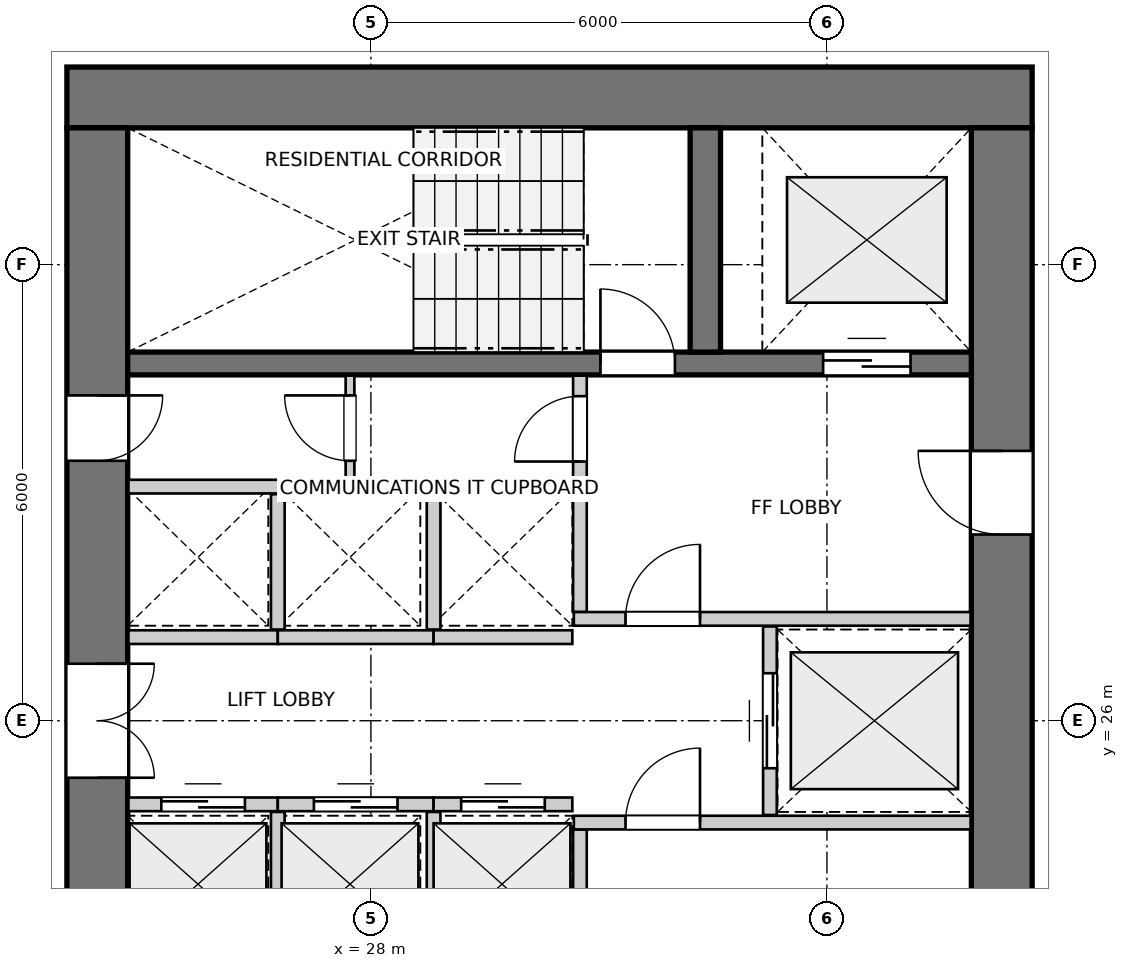
"""IFC4 building model, lengths in metres.
Left out: names, types, materials, properties, quantities, classifications, styles, units other than length and angle.
Written with IfcOpenShell. Run it as: python <this file> out.ifc"""

import sys

from ifc_helpers import new_model, si_unit, direction, frame, frame_2d, origin, place, context, subcontext, project, spatial, rectangle, extrude, source, transform, mapped, element, fill, save


model = new_model("IFC4")
c1 = context("Model", 3, precision=1e-05, world=origin(), true_north=direction((0.0, 1.0)))
c2 = subcontext(c1, "Body", "Model", "MODEL_VIEW")
j1 = project(units=[si_unit("LENGTHUNIT", "METRE"), si_unit("PLANEANGLEUNIT", "RADIAN")], contexts=[c1])
p1 = place(None, origin())
s1 = spatial("IfcSite", under=j1, at=p1, CompositionType="ELEMENT")
p2 = place(p1, origin())
s2 = spatial("IfcBuilding", under=s1, at=p2, CompositionType="ELEMENT")
p3 = place(p2, frame((0.0, 0.0, 46.2)))
s3 = spatial("IfcBuildingStorey", under=s2, at=p3, CompositionType="ELEMENT", Elevation=46.2)
p4 = place(p3, frame((36.7, 34.2, 0.0), z_axis=(0.0, 0.0, 1.0), x_axis=(-1.0, 0.0, 0.0)))
e1 = element("IfcWall", 1, at=p4, inside=s3, PredefinedType="SHEAR", context=c2, shape_type="SweptSolid", body=[
    extrude(rectangle(XDim=12.7, YDim=0.8, at=frame_2d((6.35, 0.0))), origin(), (0.0, 0.0, 1.0), 2.94),
])
p5 = place(p3, frame((24.4, 33.8, 0.0), z_axis=(0.0, 0.0, 1.0), x_axis=(0.0, -1.0, 0.0)))
e2 = element("IfcWall", 2, at=p5, inside=s3, PredefinedType="SHEAR", context=c2, shape_type="SweptSolid", body=[
    extrude(rectangle(XDim=15.6, YDim=0.8, at=frame_2d((7.8, 0.0))), origin(), (0.0, 0.0, 1.0), 2.94),
])
p6 = place(p5, frame((7.05, 0.0, 0.0)))
e3 = element("IfcOpeningElement", 3, at=p6, cuts=e2, PredefinedType="OPENING", context=c2, shape_type="SweptSolid", body=[
    extrude(rectangle(XDim=1.5, YDim=2.15, at=frame_2d((0.75, 1.075))), frame((0.0, 0.41, 0.0), z_axis=(0.0, -1.0, 0.0), x_axis=(1.0, 0.0, 0.0)), (0.0, 0.0, 1.0), 0.82),
])
p7 = place(p5, frame((3.52, 0.0, 0.0)))
e4 = element("IfcOpeningElement", 4, at=p7, cuts=e2, PredefinedType="OPENING", context=c2, shape_type="SweptSolid", body=[
    extrude(rectangle(XDim=0.86, YDim=2.05, at=frame_2d((0.43, 1.025))), frame((0.0, 0.41, 0.0), z_axis=(0.0, -1.0, 0.0), x_axis=(1.0, 0.0, 0.0)), (0.0, 0.0, 1.0), 0.82),
])
p8 = place(p5, frame((11.22, 0.0, 0.0)))
e5 = element("IfcOpeningElement", 5, at=p8, cuts=e2, PredefinedType="OPENING", context=c2, shape_type="SweptSolid", body=[
    extrude(rectangle(XDim=0.86, YDim=2.05, at=frame_2d((0.43, 1.025))), frame((0.0, 0.41, 0.0), z_axis=(0.0, -1.0, 0.0), x_axis=(1.0, 0.0, 0.0)), (0.0, 0.0, 1.0), 0.82),
])
p9 = place(p3, frame((36.3, 18.2, 0.0), z_axis=(0.0, 0.0, 1.0), x_axis=(0.0, 1.0, 0.0)))
e6 = element("IfcWall", 6, at=p9, inside=s3, PredefinedType="SHEAR", context=c2, shape_type="SweptSolid", body=[
    extrude(rectangle(XDim=15.6, YDim=0.8, at=frame_2d((7.8, 0.0))), origin(), (0.0, 0.0, 1.0), 2.94),
])
p10 = place(p9, frame((4.25, 0.0, 0.0)))
e7 = element("IfcOpeningElement", 7, at=p10, cuts=e6, PredefinedType="OPENING", context=c2, shape_type="SweptSolid", body=[
    extrude(rectangle(XDim=1.1, YDim=2.15, at=frame_2d((0.55, 1.075))), frame((0.0, 0.41, 0.0), z_axis=(0.0, -1.0, 0.0), x_axis=(1.0, 0.0, 0.0)), (0.0, 0.0, 1.0), 0.82),
])
p11 = place(p9, frame((10.25, 0.0, 0.0)))
e8 = element("IfcOpeningElement", 8, at=p11, cuts=e6, PredefinedType="OPENING", context=c2, shape_type="SweptSolid", body=[
    extrude(rectangle(XDim=1.1, YDim=2.15, at=frame_2d((0.55, 1.075))), frame((0.0, 0.41, 0.0), z_axis=(0.0, -1.0, 0.0), x_axis=(1.0, 0.0, 0.0)), (0.0, 0.0, 1.0), 0.82),
])
p12 = place(p3, frame((24.8, 30.7, 0.0), z_axis=(0.0, 0.0, 1.0), x_axis=(1.0, 0.0, 0.0)))
e9 = element("IfcWall", 9, at=p12, inside=s3, PredefinedType="SHEAR", context=c2, shape_type="SweptSolid", body=[
    extrude(rectangle(XDim=11.1, YDim=0.3, at=frame_2d((5.55, 0.0))), origin(), (0.0, 0.0, 1.0), 2.94),
])
p13 = place(p12, frame((6.22, 0.0, 0.0)))
e10 = element("IfcOpeningElement", 10, at=p13, cuts=e9, PredefinedType="OPENING", context=c2, shape_type="SweptSolid", body=[
    extrude(rectangle(XDim=0.98, YDim=2.15, at=frame_2d((0.49, 1.075))), frame((0.0, 0.16, 0.0), z_axis=(0.0, -1.0, 0.0), x_axis=(1.0, 0.0, 0.0)), (0.0, 0.0, 1.0), 0.32),
])
p14 = place(p12, frame((9.15, 0.0, 0.0)))
e11 = element("IfcOpeningElement", 11, at=p14, cuts=e9, PredefinedType="OPENING", context=c2, shape_type="SweptSolid", body=[
    extrude(rectangle(XDim=1.15, YDim=2.15, at=frame_2d((0.575, 1.075))), frame((0.0, 0.16, 0.0), z_axis=(0.0, -1.0, 0.0), x_axis=(1.0, 0.0, 0.0)), (0.0, 0.0, 1.0), 0.32),
])
p15 = place(p3, frame((32.4, 30.85, 0.0), z_axis=(0.0, 0.0, 1.0), x_axis=(0.0, 1.0, 0.0)))
e12 = element("IfcWall", 12, at=p15, inside=s3, PredefinedType="SHEAR", context=c2, shape_type="SweptSolid", body=[
    extrude(rectangle(XDim=2.95, YDim=0.4, at=frame_2d((1.475, 0.0))), origin(), (0.0, 0.0, 1.0), 2.94),
])
p16 = place(p3, frame((30.75, 21.46, 0.0), z_axis=(0.0, 0.0, 1.0), x_axis=(0.0, 1.0, 0.0)))
e13 = element("IfcWall", 13, at=p16, inside=s3, PredefinedType="PARTITIONING", context=c2, shape_type="SweptSolid", body=[
    extrude(rectangle(XDim=3.11, YDim=0.18, at=frame_2d((1.555, 0.0))), origin(), (0.0, 0.0, 1.0), 2.94),
])
p17 = place(p16, frame((0.26, 0.0, 0.0)))
e14 = element("IfcOpeningElement", 14, at=p17, cuts=e13, PredefinedType="OPENING", context=c2, shape_type="SweptSolid", body=[
    extrude(rectangle(XDim=0.86, YDim=2.05, at=frame_2d((0.43, 1.025))), frame((0.0, 0.1, 0.0), z_axis=(0.0, -1.0, 0.0), x_axis=(1.0, 0.0, 0.0)), (0.0, 0.0, 1.0), 0.2),
])
p18 = place(p3, frame((30.67, 24.66, 0.0), z_axis=(0.0, 0.0, 1.0), x_axis=(1.0, 0.0, 0.0)))
e15 = element("IfcWall", 15, at=p18, inside=s3, PredefinedType="PARTITIONING", context=c2, shape_type="SweptSolid", body=[
    extrude(rectangle(XDim=5.22, YDim=0.18, at=frame_2d((2.61, 0.0))), origin(), (0.0, 0.0, 1.0), 2.94),
])
p19 = place(p18, frame((0.68, 0.0, 0.0)))
e16 = element("IfcOpeningElement", 16, at=p19, cuts=e15, PredefinedType="OPENING", context=c2, shape_type="SweptSolid", body=[
    extrude(rectangle(XDim=0.98, YDim=2.15, at=frame_2d((0.49, 1.075))), frame((0.0, 0.1, 0.0), z_axis=(0.0, -1.0, 0.0), x_axis=(1.0, 0.0, 0.0)), (0.0, 0.0, 1.0), 0.2),
])
p20 = place(p3, frame((30.75, 27.43, 0.0), z_axis=(0.0, 0.0, 1.0), x_axis=(0.0, 1.0, 0.0)))
e17 = element("IfcWall", 17, at=p20, inside=s3, PredefinedType="PARTITIONING", context=c2, shape_type="SweptSolid", body=[
    extrude(rectangle(XDim=3.11, YDim=0.18, at=frame_2d((1.555, 0.0))), origin(), (0.0, 0.0, 1.0), 2.94),
])
p21 = place(p20, frame((1.98, 0.0, 0.0)))
e18 = element("IfcOpeningElement", 18, at=p21, cuts=e17, PredefinedType="OPENING", context=c2, shape_type="SweptSolid", body=[
    extrude(rectangle(XDim=0.86, YDim=2.05, at=frame_2d((0.43, 1.025))), frame((0.0, 0.1, 0.0), z_axis=(0.0, -1.0, 0.0), x_axis=(1.0, 0.0, 0.0)), (0.0, 0.0, 1.0), 0.2),
])
p22 = place(p3, frame((30.67, 27.34, 0.0), z_axis=(0.0, 0.0, 1.0), x_axis=(1.0, 0.0, 0.0)))
e19 = element("IfcWall", 19, at=p22, inside=s3, PredefinedType="PARTITIONING", context=c2, shape_type="SweptSolid", body=[
    extrude(rectangle(XDim=5.22, YDim=0.18, at=frame_2d((2.61, 0.0))), origin(), (0.0, 0.0, 1.0), 2.94),
])
p23 = place(p22, frame((0.68, 0.0, 0.0)))
e20 = element("IfcOpeningElement", 20, at=p23, cuts=e19, PredefinedType="OPENING", context=c2, shape_type="SweptSolid", body=[
    extrude(rectangle(XDim=0.98, YDim=2.15, at=frame_2d((0.49, 1.075))), frame((0.0, 0.1, 0.0), z_axis=(0.0, -1.0, 0.0), x_axis=(1.0, 0.0, 0.0)), (0.0, 0.0, 1.0), 0.2),
])
p24 = place(p3, frame((33.25, 24.76, 0.0), z_axis=(0.0, 0.0, 1.0), x_axis=(0.0, 1.0, 0.0)))
e21 = element("IfcWall", 21, at=p24, inside=s3, PredefinedType="PARTITIONING", context=c2, shape_type="SweptSolid", body=[
    extrude(rectangle(XDim=2.48, YDim=0.18, at=frame_2d((1.24, 0.0))), origin(), (0.0, 0.0, 1.0), 2.94),
])
p25 = place(p24, frame((0.615, 0.0, 0.0)))
e22 = element("IfcOpeningElement", 22, at=p25, cuts=e21, PredefinedType="OPENING", context=c2, shape_type="SweptSolid", body=[
    extrude(rectangle(XDim=1.25, YDim=2.15, at=frame_2d((0.625, 1.075))), frame((0.0, 0.1, 0.0), z_axis=(0.0, -1.0, 0.0), x_axis=(1.0, 0.0, 0.0)), (0.0, 0.0, 1.0), 0.2),
])
p26 = place(p3, frame((24.81, 24.9, 0.0), z_axis=(0.0, 0.0, 1.0), x_axis=(1.0, 0.0, 0.0)))
e23 = element("IfcWall", 23, at=p26, inside=s3, PredefinedType="PARTITIONING", context=c2, shape_type="SweptSolid", body=[
    extrude(rectangle(XDim=1.965, YDim=0.18, at=frame_2d((0.982, 0.0))), origin(), (0.0, 0.0, 1.0), 2.94),
])
p27 = place(p26, frame((0.433, 0.0, 0.0)))
e24 = element("IfcOpeningElement", 24, at=p27, cuts=e23, PredefinedType="OPENING", context=c2, shape_type="SweptSolid", body=[
    extrude(rectangle(XDim=1.1, YDim=2.15, at=frame_2d((0.55, 1.075))), frame((0.0, 0.1, 0.0), z_axis=(0.0, -1.0, 0.0), x_axis=(1.0, 0.0, 0.0)), (0.0, 0.0, 1.0), 0.2),
])
p28 = place(p3, frame((26.775, 24.9, 0.0), z_axis=(0.0, 0.0, 1.0), x_axis=(1.0, 0.0, 0.0)))
e25 = element("IfcWall", 25, at=p28, inside=s3, PredefinedType="PARTITIONING", context=c2, shape_type="SweptSolid", body=[
    extrude(rectangle(XDim=2.05, YDim=0.18, at=frame_2d((1.025, 0.0))), origin(), (0.0, 0.0, 1.0), 2.94),
])
p29 = place(p28, frame((0.475, 0.0, 0.0)))
e26 = element("IfcOpeningElement", 26, at=p29, cuts=e25, PredefinedType="OPENING", context=c2, shape_type="SweptSolid", body=[
    extrude(rectangle(XDim=1.1, YDim=2.15, at=frame_2d((0.55, 1.075))), frame((0.0, 0.1, 0.0), z_axis=(0.0, -1.0, 0.0), x_axis=(1.0, 0.0, 0.0)), (0.0, 0.0, 1.0), 0.2),
])
p30 = place(p3, frame((26.775, 23.02, 0.0), z_axis=(0.0, 0.0, 1.0), x_axis=(0.0, 1.0, 0.0)))
e27 = element("IfcWall", 27, at=p30, inside=s3, PredefinedType="PARTITIONING", context=c2, shape_type="SweptSolid", body=[
    extrude(rectangle(XDim=1.78, YDim=0.18, at=frame_2d((0.89, 0.0))), origin(), (0.0, 0.0, 1.0), 2.94),
])
p31 = place(p3, frame((28.825, 24.9, 0.0), z_axis=(0.0, 0.0, 1.0), x_axis=(1.0, 0.0, 0.0)))
e28 = element("IfcWall", 28, at=p31, inside=s3, PredefinedType="PARTITIONING", context=c2, shape_type="SweptSolid", body=[
    extrude(rectangle(XDim=1.825, YDim=0.18, at=frame_2d((0.913, 0.0))), origin(), (0.0, 0.0, 1.0), 2.94),
])
p32 = place(p31, frame((0.363, 0.0, 0.0)))
e29 = element("IfcOpeningElement", 29, at=p32, cuts=e28, PredefinedType="OPENING", context=c2, shape_type="SweptSolid", body=[
    extrude(rectangle(XDim=1.1, YDim=2.15, at=frame_2d((0.55, 1.075))), frame((0.0, 0.1, 0.0), z_axis=(0.0, -1.0, 0.0), x_axis=(1.0, 0.0, 0.0)), (0.0, 0.0, 1.0), 0.2),
])
p33 = place(p3, frame((28.825, 23.02, 0.0), z_axis=(0.0, 0.0, 1.0), x_axis=(0.0, 1.0, 0.0)))
e30 = element("IfcWall", 30, at=p33, inside=s3, PredefinedType="PARTITIONING", context=c2, shape_type="SweptSolid", body=[
    extrude(rectangle(XDim=1.78, YDim=0.18, at=frame_2d((0.89, 0.0))), origin(), (0.0, 0.0, 1.0), 2.94),
])
p34 = place(p3, frame((24.81, 29.08, 0.0), z_axis=(0.0, 0.0, 1.0), x_axis=(1.0, 0.0, 0.0)))
e31 = element("IfcWall", 31, at=p34, inside=s3, PredefinedType="PARTITIONING", context=c2, shape_type="SweptSolid", body=[
    extrude(rectangle(XDim=5.84, YDim=0.18, at=frame_2d((2.92, 0.0))), origin(), (0.0, 0.0, 1.0), 2.94),
])
p35 = place(p3, frame((24.81, 27.1, 0.0), z_axis=(0.0, 0.0, 1.0), x_axis=(1.0, 0.0, 0.0)))
e32 = element("IfcWall", 32, at=p35, inside=s3, PredefinedType="PARTITIONING", context=c2, shape_type="SweptSolid", body=[
    extrude(rectangle(XDim=1.965, YDim=0.18, at=frame_2d((0.982, 0.0))), origin(), (0.0, 0.0, 1.0), 2.94),
])
p36 = place(p3, frame((26.775, 27.1, 0.0), z_axis=(0.0, 0.0, 1.0), x_axis=(1.0, 0.0, 0.0)))
e33 = element("IfcWall", 33, at=p36, inside=s3, PredefinedType="PARTITIONING", context=c2, shape_type="SweptSolid", body=[
    extrude(rectangle(XDim=2.05, YDim=0.18, at=frame_2d((1.025, 0.0))), origin(), (0.0, 0.0, 1.0), 2.94),
])
p37 = place(p3, frame((26.775, 27.2, 0.0), z_axis=(0.0, 0.0, 1.0), x_axis=(0.0, 1.0, 0.0)))
e34 = element("IfcWall", 34, at=p37, inside=s3, PredefinedType="PARTITIONING", context=c2, shape_type="SweptSolid", body=[
    extrude(rectangle(XDim=1.78, YDim=0.18, at=frame_2d((0.89, 0.0))), origin(), (0.0, 0.0, 1.0), 2.94),
])
p38 = place(p3, frame((28.825, 27.1, 0.0), z_axis=(0.0, 0.0, 1.0), x_axis=(1.0, 0.0, 0.0)))
e35 = element("IfcWall", 35, at=p38, inside=s3, PredefinedType="PARTITIONING", context=c2, shape_type="SweptSolid", body=[
    extrude(rectangle(XDim=1.825, YDim=0.18, at=frame_2d((0.913, 0.0))), origin(), (0.0, 0.0, 1.0), 2.94),
])
p39 = place(p3, frame((28.825, 27.2, 0.0), z_axis=(0.0, 0.0, 1.0), x_axis=(0.0, 1.0, 0.0)))
e36 = element("IfcWall", 36, at=p39, inside=s3, PredefinedType="PARTITIONING", context=c2, shape_type="SweptSolid", body=[
    extrude(rectangle(XDim=1.78, YDim=0.18, at=frame_2d((0.89, 0.0))), origin(), (0.0, 0.0, 1.0), 2.94),
])
p40 = place(p3, frame((27.725, 29.16, 0.0), z_axis=(0.0, 0.0, 1.0), x_axis=(0.0, 1.0, 0.0)))
e37 = element("IfcWall", 37, at=p40, inside=s3, PredefinedType="PARTITIONING", context=c2, shape_type="SweptSolid", body=[
    extrude(rectangle(XDim=1.38, YDim=0.115, at=frame_2d((0.69, 0.0))), origin(), (0.0, 0.0, 1.0), 2.94),
])
p41 = place(p40, frame((0.26, 0.0, 0.0)))
e38 = element("IfcOpeningElement", 38, at=p41, cuts=e37, PredefinedType="OPENING", context=c2, shape_type="SweptSolid", body=[
    extrude(rectangle(XDim=0.86, YDim=2.05, at=frame_2d((0.43, 1.025))), frame((0.0, 0.067, 0.0), z_axis=(0.0, -1.0, 0.0), x_axis=(1.0, 0.0, 0.0)), (0.0, 0.0, 1.0), 0.135),
])
m1 = source(origin(), c2, "Body", "SweptSolid", [
    extrude(rectangle(XDim=0.98, YDim=2.15, at=frame_2d((0.49, 1.075))), frame((0.0, 0.025, 0.0), z_axis=(0.0, -1.0, 0.0), x_axis=(1.0, 0.0, 0.0)), (0.0, 0.0, 1.0), 0.05),
])
p42 = place(p13, origin())
e39 = element("IfcDoor", 39, at=p42, inside=s3, OperationType="SINGLE_SWING_LEFT", PredefinedType="DOOR", context=c2, shape_type="MappedRepresentation", body=[
    mapped(m1, transform((0.0, 0.0, 0.0), x_axis=(1.0, 0.0, 0.0), y_axis=(0.0, 1.0, 0.0), z_axis=(0.0, 0.0, 1.0), scale=1.0)),
])
fill(e10, e39)
m2 = source(origin(), c2, "Body", "SweptSolid", [
    extrude(rectangle(XDim=1.15, YDim=2.15, at=frame_2d((0.575, 1.075))), frame((0.0, 0.025, 0.0), z_axis=(0.0, -1.0, 0.0), x_axis=(1.0, 0.0, 0.0)), (0.0, 0.0, 1.0), 0.05),
])
p43 = place(p14, origin())
e40 = element("IfcDoor", 40, at=p43, inside=s3, OperationType="DOUBLE_DOOR_SLIDING", PredefinedType="DOOR", context=c2, shape_type="MappedRepresentation", body=[
    mapped(m2, transform((0.0, 0.0, 0.0), x_axis=(1.0, 0.0, 0.0), y_axis=(0.0, 1.0, 0.0), z_axis=(0.0, 0.0, 1.0), scale=1.0)),
])
fill(e11, e40)
m3 = source(origin(), c2, "Body", "SweptSolid", [
    extrude(rectangle(XDim=1.1, YDim=2.15, at=frame_2d((0.55, 1.075))), frame((0.0, 0.025, 0.0), z_axis=(0.0, -1.0, 0.0), x_axis=(1.0, 0.0, 0.0)), (0.0, 0.0, 1.0), 0.05),
])
p44 = place(p11, origin())
e41 = element("IfcDoor", 41, at=p44, inside=s3, OperationType="SINGLE_SWING_RIGHT", PredefinedType="DOOR", context=c2, shape_type="MappedRepresentation", body=[
    mapped(m3, transform((0.0, 0.0, 0.0), x_axis=(1.0, 0.0, 0.0), y_axis=(0.0, 1.0, 0.0), z_axis=(0.0, 0.0, 1.0), scale=1.0)),
])
fill(e8, e41)
m4 = source(origin(), c2, "Body", "SweptSolid", [
    extrude(rectangle(XDim=1.5, YDim=2.15, at=frame_2d((0.75, 1.075))), frame((0.0, 0.025, 0.0), z_axis=(0.0, -1.0, 0.0), x_axis=(1.0, 0.0, 0.0)), (0.0, 0.0, 1.0), 0.05),
])
p45 = place(p6, origin())
e42 = element("IfcDoor", 42, at=p45, inside=s3, OperationType="DOUBLE_DOOR_SINGLE_SWING", PredefinedType="DOOR", context=c2, shape_type="MappedRepresentation", body=[
    mapped(m4, transform((0.0, 0.0, 0.0), x_axis=(1.0, 0.0, 0.0), y_axis=(0.0, 1.0, 0.0), z_axis=(0.0, 0.0, 1.0), scale=1.0)),
])
fill(e3, e42)
m5 = source(origin(), c2, "Body", "SweptSolid", [
    extrude(rectangle(XDim=0.86, YDim=2.05, at=frame_2d((0.43, 1.025))), frame((0.0, 0.025, 0.0), z_axis=(0.0, -1.0, 0.0), x_axis=(1.0, 0.0, 0.0)), (0.0, 0.0, 1.0), 0.05),
])
p46 = place(p7, origin())
e43 = element("IfcDoor", 43, at=p46, inside=s3, OperationType="SINGLE_SWING_LEFT", PredefinedType="DOOR", context=c2, shape_type="MappedRepresentation", body=[
    mapped(m5, transform((0.0, 0.0, 0.0), x_axis=(1.0, 0.0, 0.0), y_axis=(0.0, 1.0, 0.0), z_axis=(0.0, 0.0, 1.0), scale=1.0)),
])
fill(e4, e43)
p47 = place(p19, origin())
e44 = element("IfcDoor", 44, at=p47, inside=s3, OperationType="SINGLE_SWING_RIGHT", PredefinedType="DOOR", context=c2, shape_type="MappedRepresentation", body=[
    mapped(m1, transform((0.0, 0.0, 0.0), x_axis=(1.0, 0.0, 0.0), y_axis=(0.0, 1.0, 0.0), z_axis=(0.0, 0.0, 1.0), scale=1.0)),
])
fill(e16, e44)
p48 = place(p21, origin())
e45 = element("IfcDoor", 45, at=p48, inside=s3, OperationType="SINGLE_SWING_LEFT", PredefinedType="DOOR", context=c2, shape_type="MappedRepresentation", body=[
    mapped(m5, transform((0.0, 0.0, 0.0), x_axis=(1.0, 0.0, 0.0), y_axis=(0.0, 1.0, 0.0), z_axis=(0.0, 0.0, 1.0), scale=1.0)),
])
fill(e18, e45)
p49 = place(p23, origin())
e46 = element("IfcDoor", 46, at=p49, inside=s3, OperationType="SINGLE_SWING_RIGHT", PredefinedType="DOOR", context=c2, shape_type="MappedRepresentation", body=[
    mapped(m1, transform((0.0, 0.0, 0.0), x_axis=(1.0, 0.0, 0.0), y_axis=(0.0, 1.0, 0.0), z_axis=(0.0, 0.0, 1.0), scale=1.0)),
])
fill(e20, e46)
m6 = source(origin(), c2, "Body", "SweptSolid", [
    extrude(rectangle(XDim=1.25, YDim=2.15, at=frame_2d((0.625, 1.075))), frame((0.0, 0.025, 0.0), z_axis=(0.0, -1.0, 0.0), x_axis=(1.0, 0.0, 0.0)), (0.0, 0.0, 1.0), 0.05),
])
p50 = place(p25, origin())
e47 = element("IfcDoor", 47, at=p50, inside=s3, OperationType="DOUBLE_DOOR_SLIDING", PredefinedType="DOOR", context=c2, shape_type="MappedRepresentation", body=[
    mapped(m6, transform((0.0, 0.0, 0.0), x_axis=(1.0, 0.0, 0.0), y_axis=(0.0, 1.0, 0.0), z_axis=(0.0, 0.0, 1.0), scale=1.0)),
])
fill(e22, e47)
p51 = place(p27, origin())
e48 = element("IfcDoor", 48, at=p51, inside=s3, OperationType="DOUBLE_DOOR_SLIDING", PredefinedType="DOOR", context=c2, shape_type="MappedRepresentation", body=[
    mapped(m3, transform((0.0, 0.0, 0.0), x_axis=(1.0, 0.0, 0.0), y_axis=(0.0, 1.0, 0.0), z_axis=(0.0, 0.0, 1.0), scale=1.0)),
])
fill(e24, e48)
p52 = place(p29, origin())
e49 = element("IfcDoor", 49, at=p52, inside=s3, OperationType="DOUBLE_DOOR_SLIDING", PredefinedType="DOOR", context=c2, shape_type="MappedRepresentation", body=[
    mapped(m3, transform((0.0, 0.0, 0.0), x_axis=(1.0, 0.0, 0.0), y_axis=(0.0, 1.0, 0.0), z_axis=(0.0, 0.0, 1.0), scale=1.0)),
])
fill(e26, e49)
p53 = place(p32, origin())
e50 = element("IfcDoor", 50, at=p53, inside=s3, OperationType="DOUBLE_DOOR_SLIDING", PredefinedType="DOOR", context=c2, shape_type="MappedRepresentation", body=[
    mapped(m3, transform((0.0, 0.0, 0.0), x_axis=(1.0, 0.0, 0.0), y_axis=(0.0, 1.0, 0.0), z_axis=(0.0, 0.0, 1.0), scale=1.0)),
])
fill(e29, e50)
p54 = place(p41, origin())
e51 = element("IfcDoor", 51, at=p54, inside=s3, OperationType="SINGLE_SWING_RIGHT", PredefinedType="DOOR", context=c2, shape_type="MappedRepresentation", body=[
    mapped(m5, transform((0.0, 0.0, 0.0), x_axis=(1.0, 0.0, 0.0), y_axis=(0.0, 1.0, 0.0), z_axis=(0.0, 0.0, 1.0), scale=1.0)),
])
fill(e38, e51)
save(model, sys.argv[1])
